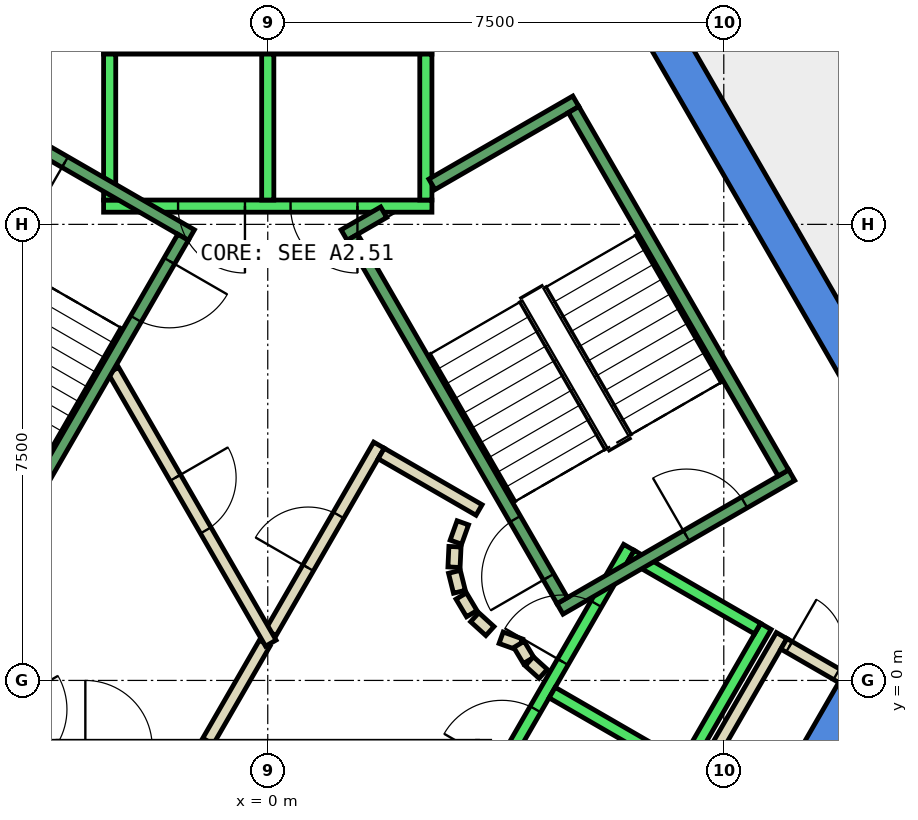
"""IFC4 building model, lengths in metres.
Left out: names, types, materials, properties, quantities, classifications, styles, units other than length and angle.
Written with IfcOpenShell. Run it as: python <this file> out.ifc"""

import sys

from ifc_helpers import new_model, si_unit, direction, frame, frame_2d, origin, place, context, subcontext, project, spatial, polyline, rectangle, outline, extrude, element, fill, save


model = new_model("IFC4")
c1 = context("Model", 3, precision=1e-05, world=origin(), true_north=direction((0.0, 1.0)))
c2 = subcontext(c1, "Body", "Model", "MODEL_VIEW")
j1 = project(units=[si_unit("LENGTHUNIT", "METRE"), si_unit("PLANEANGLEUNIT", "RADIAN")], contexts=[c1])
p1 = place(None, origin())
s1 = spatial("IfcSite", under=j1, at=p1, CompositionType="ELEMENT")
p2 = place(p1, origin())
s2 = spatial("IfcBuilding", under=s1, at=p2, CompositionType="ELEMENT")
p3 = place(p2, frame((0.0, 0.0, 248.6)))
s3 = spatial("IfcBuildingStorey", under=s2, at=p3, CompositionType="ELEMENT", Elevation=248.6)
p4 = place(p3, frame((0.0, 0.0, -0.34)))
e1 = element("IfcWall", 1, at=p4, inside=s3, PredefinedType="SHEAR", context=c2, shape_type="SweptSolid", body=[
    extrude(outline(polyline([(6.786, 10.747), (6.266, 10.447), (10.854, 2.5), (11.547, 2.5), (6.786, 10.747)])), origin(), (0.0, 0.0, 1.0), 3.6),
])
p5 = place(p3, frame((0.0, 0.0, -0.34)))
e2 = element("IfcWall", 2, at=p5, inside=s3, PredefinedType="SHEAR", context=c2, shape_type="SweptSolid", body=[
    extrude(outline(polyline([(5.774, -7.5), (11.547, 2.5), (10.854, 2.5), (5.427, -6.9), (5.774, -7.5)])), origin(), (0.0, 0.0, 1.0), 3.6),
])
p6 = place(p3, frame((8.939, 12.559, 0.0), z_axis=(0.0, 0.0, 1.0), x_axis=(0.517045022441, -0.855958202699, 0.0)))
e3 = element("IfcWall", 3, at=p6, inside=s3, PredefinedType="PARTITIONING", context=c2, shape_type="SweptSolid", body=[
    extrude(rectangle(XDim=3.166, YDim=0.2, at=frame_2d((1.583, 0.0))), origin(), (0.0, 0.0, 1.0), 3.26),
])
p7 = place(p6, frame((1.083, 0.0, 0.0)))
e4 = element("IfcOpeningElement", 4, at=p7, cuts=e3, PredefinedType="OPENING", context=c2, shape_type="SweptSolid", body=[
    extrude(rectangle(XDim=1.0, YDim=2.1, at=frame_2d((0.5, 1.05))), frame((0.0, 0.11, 0.0), z_axis=(0.0, -1.0, 0.0), x_axis=(1.0, 0.0, 0.0)), (0.0, 0.0, 1.0), 0.22),
])
p8 = place(p3, frame((5.751, -3.938, 0.0), z_axis=(0.0, 0.0, 1.0), x_axis=(0.500034260056, 0.866005622828, 0.0)))
e5 = element("IfcWall", 5, at=p8, inside=s3, PredefinedType="PARTITIONING", context=c2, shape_type="SweptSolid", body=[
    extrude(rectangle(XDim=5.399, YDim=0.2, at=frame_2d((2.7, 0.0))), origin(), (0.0, 0.0, 1.0), 3.26),
])
p9 = place(p3, frame((8.488, 0.602, 0.0), z_axis=(0.0, 0.0, 1.0), x_axis=(0.866063652425, -0.499933745558, 0.0)))
e6 = element("IfcWall", 6, at=p9, inside=s3, PredefinedType="PARTITIONING", context=c2, shape_type="SweptSolid", body=[
    extrude(rectangle(XDim=1.1, YDim=0.2, at=frame_2d((0.55, 0.0))), origin(), (0.0, 0.0, 1.0), 3.26),
])
p10 = place(p9, frame((0.1, 0.0, 0.0)))
e7 = element("IfcOpeningElement", 7, at=p10, cuts=e6, PredefinedType="OPENING", context=c2, shape_type="SweptSolid", body=[
    extrude(rectangle(XDim=0.9, YDim=2.1, at=frame_2d((0.45, 1.05))), frame((0.0, 0.11, 0.0), z_axis=(0.0, -1.0, 0.0), x_axis=(1.0, 0.0, 0.0)), (0.0, 0.0, 1.0), 0.22),
])
p11 = place(p3, frame((9.358, -4.692, 0.0), z_axis=(0.0, 0.0, 1.0), x_axis=(0.500027777314, 0.866009365951, 0.0)))
e8 = element("IfcWall", 8, at=p11, inside=s3, PredefinedType="PARTITIONING", context=c2, shape_type="SweptSolid", body=[
    extrude(rectangle(XDim=7.36, YDim=0.15, at=frame_2d((3.68, 0.0))), origin(), (0.0, 0.0, 1.0), 3.26),
])
p12 = place(p3, frame((-0.982, -1.0, 0.0), z_axis=(0.0, 0.0, 1.0), x_axis=(0.50024047865, 0.865886518847, 0.0)))
e9 = element("IfcWall", 9, at=p12, inside=s3, PredefinedType="PARTITIONING", context=c2, shape_type="SweptSolid", body=[
    extrude(rectangle(XDim=1.863, YDim=0.2, at=frame_2d((0.931, 0.0))), origin(), (0.0, 0.0, 1.0), 3.26),
])
p13 = place(p3, frame((0.05, 0.787, 0.0), z_axis=(0.0, 0.0, 1.0), x_axis=(0.499954076797, 0.866051915934, 0.0)))
e10 = element("IfcWall", 10, at=p13, inside=s3, PredefinedType="PARTITIONING", context=c2, shape_type="SweptSolid", body=[
    extrude(rectangle(XDim=3.558, YDim=0.2, at=frame_2d((1.779, 0.0))), origin(), (0.0, 0.0, 1.0), 3.26),
])
p14 = place(p13, frame((1.229, 0.0, 0.0)))
e11 = element("IfcOpeningElement", 11, at=p14, cuts=e10, PredefinedType="OPENING", context=c2, shape_type="SweptSolid", body=[
    extrude(rectangle(XDim=1.0, YDim=2.1, at=frame_2d((0.5, 1.05))), frame((0.0, 0.11, 0.0), z_axis=(0.0, -1.0, 0.0), x_axis=(1.0, 0.0, 0.0)), (0.0, 0.0, 1.0), 0.22),
])
p15 = place(p3, frame((1.866, 3.732, 0.0), z_axis=(0.0, 0.0, 1.0), x_axis=(0.866043361281, -0.499968895414, 0.0)))
e12 = element("IfcWall", 12, at=p15, inside=s3, PredefinedType="PARTITIONING", context=c2, shape_type="SweptSolid", body=[
    extrude(rectangle(XDim=1.858, YDim=0.2, at=frame_2d((0.929, 0.0))), origin(), (0.0, 0.0, 1.0), 3.26),
])
p16 = place(p3, frame((3.208, 2.592, 0.0), z_axis=(0.0, 0.0, 1.0), x_axis=(-0.337388820924, -0.941365382578, 0.0)))
e13 = element("IfcWall", 13, at=p16, inside=s3, PredefinedType="PARTITIONING", context=c2, shape_type="SweptSolid", body=[
    extrude(rectangle(XDim=0.338, YDim=0.2, at=frame_2d((0.169, 0.0))), origin(), (0.0, 0.0, 1.0), 3.26),
])
p17 = place(p3, frame((3.079, 2.199, 0.0), z_axis=(0.0, 0.0, 1.0), x_axis=(-0.047771483479, -0.998858290933, 0.0)))
e14 = element("IfcWall", 14, at=p17, inside=s3, PredefinedType="PARTITIONING", context=c2, shape_type="SweptSolid", body=[
    extrude(rectangle(XDim=0.337, YDim=0.2, at=frame_2d((0.169, 0.0))), origin(), (0.0, 0.0, 1.0), 3.26),
])
p18 = place(p3, frame((3.07, 1.786, 0.0), z_axis=(0.0, 0.0, 1.0), x_axis=(0.242705583207, -0.970099994784, 0.0)))
e15 = element("IfcWall", 15, at=p18, inside=s3, PredefinedType="PARTITIONING", context=c2, shape_type="SweptSolid", body=[
    extrude(rectangle(XDim=0.338, YDim=0.2, at=frame_2d((0.169, 0.0))), origin(), (0.0, 0.0, 1.0), 3.26),
])
for number, where, z_axis, x_axis in (
    (16, (3.182, 1.388, 0.0), (0.0, 0.0, 1.0), (0.512, -0.859, 0.0)),
    (17, (3.404, 1.039, 0.0), (0.0, 0.0, 1.0), (0.74, -0.672, 0.0)),
):
    element("IfcWall", number, at=place(p3, frame(where, z_axis=z_axis, x_axis=x_axis)), inside=s3, PredefinedType="PARTITIONING", context=c2, shape_type="SweptSolid", body=[
        extrude(rectangle(XDim=0.338, YDim=0.2, at=frame_2d((0.169, 0.0))), origin(), (0.0, 0.0, 1.0), 3.26),
    ])
p19 = place(p3, frame((3.838, 0.702, 0.0), z_axis=(0.0, 0.0, 1.0), x_axis=(0.941035081519, -0.338308993895, 0.0)))
e18 = element("IfcWall", 18, at=p19, inside=s3, PredefinedType="PARTITIONING", context=c2, shape_type="SweptSolid", body=[
    extrude(rectangle(XDim=0.337, YDim=0.2, at=frame_2d((0.168, 0.0))), origin(), (0.0, 0.0, 1.0), 3.26),
])
p20 = place(p3, frame((4.132, 0.593, 0.0), z_axis=(0.0, 0.0, 1.0), x_axis=(0.513561617048, -0.858052717201, 0.0)))
e19 = element("IfcWall", 19, at=p20, inside=s3, PredefinedType="PARTITIONING", context=c2, shape_type="SweptSolid", body=[
    extrude(rectangle(XDim=0.308, YDim=0.2, at=frame_2d((0.154, 0.0))), origin(), (0.0, 0.0, 1.0), 3.26),
])
p21 = place(p3, frame((4.301, 0.315, 0.0), z_axis=(0.0, 0.0, 1.0), x_axis=(0.741798017506, -0.670623367639, 0.0)))
e20 = element("IfcWall", 20, at=p21, inside=s3, PredefinedType="PARTITIONING", context=c2, shape_type="SweptSolid", body=[
    extrude(rectangle(XDim=0.309, YDim=0.2, at=frame_2d((0.154, 0.0))), origin(), (0.0, 0.0, 1.0), 3.26),
])
p22 = place(p3, frame((-2.54, 5.1, 0.0), z_axis=(0.0, 0.0, 1.0), x_axis=(0.499925051871, -0.866068670783, 0.0)))
e21 = element("IfcWall", 21, at=p22, inside=s3, PredefinedType="PARTITIONING", context=c2, shape_type="SweptSolid", body=[
    extrude(rectangle(XDim=5.181, YDim=0.2, at=frame_2d((2.59, 0.0))), origin(), (0.0, 0.0, 1.0), 3.26),
])
p23 = place(p22, frame((2.04, 0.0, 0.0)))
e22 = element("IfcOpeningElement", 22, at=p23, cuts=e21, PredefinedType="OPENING", context=c2, shape_type="SweptSolid", body=[
    extrude(rectangle(XDim=1.0, YDim=2.1, at=frame_2d((0.5, 1.05))), frame((0.0, 0.11, 0.0), z_axis=(0.0, -1.0, 0.0), x_axis=(1.0, 0.0, 0.0)), (0.0, 0.0, 1.0), 0.22),
])
p24 = place(p3, frame((2.7, 7.8, 0.0), z_axis=(0.0, 0.0, 1.0), x_axis=(-1.0, 0.0, 0.0)))
e23 = element("IfcWall", 23, at=p24, inside=s3, PredefinedType="STANDARD", context=c2, shape_type="SweptSolid", body=[
    extrude(rectangle(XDim=5.4, YDim=0.2, at=frame_2d((2.7, 0.0))), origin(), (0.0, 0.0, 1.0), 3.26),
])
p25 = place(p24, frame((1.225, 0.0, 0.0)))
e24 = element("IfcOpeningElement", 24, at=p25, cuts=e23, PredefinedType="OPENING", context=c2, shape_type="SweptSolid", body=[
    extrude(rectangle(XDim=1.1, YDim=2.1, at=frame_2d((0.55, 1.05))), frame((0.0, 0.11, 0.0), z_axis=(0.0, -1.0, 0.0), x_axis=(1.0, 0.0, 0.0)), (0.0, 0.0, 1.0), 0.22),
])
p26 = place(p24, frame((3.075, 0.0, 0.0)))
e25 = element("IfcOpeningElement", 25, at=p26, cuts=e23, PredefinedType="OPENING", context=c2, shape_type="SweptSolid", body=[
    extrude(rectangle(XDim=1.1, YDim=2.1, at=frame_2d((0.55, 1.05))), frame((0.0, 0.11, 0.0), z_axis=(0.0, -1.0, 0.0), x_axis=(1.0, 0.0, 0.0)), (0.0, 0.0, 1.0), 0.22),
])
p27 = place(p3, frame((2.7, 10.4, 0.0), z_axis=(0.0, 0.0, 1.0), x_axis=(-1.0, 0.0, 0.0)))
e26 = element("IfcWall", 26, at=p27, inside=s3, PredefinedType="STANDARD", context=c2, shape_type="SweptSolid", body=[
    extrude(rectangle(XDim=5.4, YDim=0.2, at=frame_2d((2.7, 0.0))), origin(), (0.0, 0.0, 1.0), 3.26),
])
for number, where, z_axis, x_axis in (
    (27, (2.6, 7.9, 0.0), (0.0, 0.0, 1.0), (0.0, 1.0, 0.0)),
    (28, (0.0, 7.9, 0.0), (0.0, 0.0, 1.0), (0.0, 1.0, 0.0)),
    (29, (-2.6, 7.9, 0.0), (0.0, 0.0, 1.0), (0.0, 1.0, 0.0)),
):
    element("IfcWall", number, at=place(p3, frame(where, z_axis=z_axis, x_axis=x_axis)), inside=s3, PredefinedType="STANDARD", context=c2, shape_type="SweptSolid", body=[
        extrude(rectangle(XDim=2.4, YDim=0.2, at=frame_2d((1.2, 0.0))), origin(), (0.0, 0.0, 1.0), 3.26),
    ])
p28 = place(p3, frame((-5.94, 2.188, 0.0), z_axis=(0.0, 0.0, 1.0), x_axis=(0.500034260056, -0.866005622828, 0.0)))
e30 = element("IfcWall", 30, at=p28, inside=s3, PredefinedType="STANDARD", context=c2, shape_type="SweptSolid", body=[
    extrude(rectangle(XDim=5.399, YDim=0.2, at=frame_2d((2.7, 0.0))), origin(), (0.0, 0.0, 1.0), 3.26),
])
p29 = place(p28, frame((3.075, 0.0, 0.0)))
e31 = element("IfcOpeningElement", 31, at=p29, cuts=e30, PredefinedType="OPENING", context=c2, shape_type="SweptSolid", body=[
    extrude(rectangle(XDim=1.1, YDim=2.1, at=frame_2d((0.55, 1.05))), frame((0.0, 0.11, 0.0), z_axis=(0.0, -1.0, 0.0), x_axis=(1.0, 0.0, 0.0)), (0.0, 0.0, 1.0), 0.22),
])
p30 = place(p28, frame((1.225, 0.0, 0.0)))
e32 = element("IfcOpeningElement", 32, at=p30, cuts=e30, PredefinedType="OPENING", context=c2, shape_type="SweptSolid", body=[
    extrude(rectangle(XDim=1.1, YDim=2.1, at=frame_2d((0.55, 1.05))), frame((0.0, 0.11, 0.0), z_axis=(0.0, -1.0, 0.0), x_axis=(1.0, 0.0, 0.0)), (0.0, 0.0, 1.0), 0.22),
])
p31 = place(p3, frame((3.24, -2.488, 0.0), z_axis=(0.0, 0.0, 1.0), x_axis=(0.500034260056, 0.866005622828, 0.0)))
e33 = element("IfcWall", 33, at=p31, inside=s3, PredefinedType="STANDARD", context=c2, shape_type="SweptSolid", body=[
    extrude(rectangle(XDim=5.399, YDim=0.2, at=frame_2d((2.7, 0.0))), origin(), (0.0, 0.0, 1.0), 3.26),
])
p32 = place(p31, frame((3.225, 0.0, 0.0)))
e34 = element("IfcOpeningElement", 34, at=p32, cuts=e33, PredefinedType="OPENING", context=c2, shape_type="SweptSolid", body=[
    extrude(rectangle(XDim=1.1, YDim=2.1, at=frame_2d((0.55, 1.05))), frame((0.0, 0.11, 0.0), z_axis=(0.0, -1.0, 0.0), x_axis=(1.0, 0.0, 0.0)), (0.0, 0.0, 1.0), 0.22),
])
p33 = place(p31, frame((1.225, 0.0, 0.0)))
e35 = element("IfcOpeningElement", 35, at=p33, cuts=e33, PredefinedType="OPENING", context=c2, shape_type="SweptSolid", body=[
    extrude(rectangle(XDim=1.1, YDim=2.1, at=frame_2d((0.55, 1.05))), frame((0.0, 0.11, 0.0), z_axis=(0.0, -1.0, 0.0), x_axis=(1.0, 0.0, 0.0)), (0.0, 0.0, 1.0), 0.22),
])
p34 = place(p3, frame((5.492, -3.788, 0.0), z_axis=(0.0, 0.0, 1.0), x_axis=(0.500034260056, 0.866005622828, 0.0)))
e36 = element("IfcWall", 36, at=p34, inside=s3, PredefinedType="STANDARD", context=c2, shape_type="SweptSolid", body=[
    extrude(rectangle(XDim=5.399, YDim=0.2, at=frame_2d((2.7, 0.0))), origin(), (0.0, 0.0, 1.0), 3.26),
])
for number, where, z_axis, x_axis in (
    (37, (4.677, -0.2, 0.0), (0.0, 0.0, 1.0), (0.866, -0.5, 0.0)),
    (38, (5.977, 2.052, 0.0), (0.0, 0.0, 1.0), (0.866, -0.5, 0.0)),
):
    element("IfcWall", number, at=place(p3, frame(where, z_axis=z_axis, x_axis=x_axis)), inside=s3, PredefinedType="STANDARD", context=c2, shape_type="SweptSolid", body=[
        extrude(rectangle(XDim=2.399, YDim=0.2, at=frame_2d((1.2, 0.0))), origin(), (0.0, 0.0, 1.0), 3.26),
    ])
p35 = place(p3, frame((4.806, 1.176, 0.0), z_axis=(0.0, 0.0, 1.0), x_axis=(0.866059941101, 0.499940174841, 0.0)))
e39 = element("IfcWall", 39, at=p35, inside=s3, PredefinedType="STANDARD", context=c2, shape_type="SweptSolid", body=[
    extrude(rectangle(XDim=4.4, YDim=0.2, at=frame_2d((2.2, 0.0))), origin(), (0.0, 0.0, 1.0), 3.26),
])
p36 = place(p35, frame((2.4, 0.0, 0.0)))
e40 = element("IfcOpeningElement", 40, at=p36, cuts=e39, PredefinedType="OPENING", context=c2, shape_type="SweptSolid", body=[
    extrude(rectangle(XDim=1.1, YDim=2.2, at=frame_2d((0.55, 1.1))), frame((0.0, 0.11, 0.0), z_axis=(0.0, -1.0, 0.0), x_axis=(1.0, 0.0, 0.0)), (0.0, 0.0, 1.0), 0.22),
])
p37 = place(p3, frame((2.7, 8.158, 0.0), z_axis=(0.0, 0.0, 1.0), x_axis=(0.86611865017, 0.499838457731, 0.0)))
e41 = element("IfcWall", 41, at=p37, inside=s3, PredefinedType="STANDARD", context=c2, shape_type="SweptSolid", body=[
    extrude(rectangle(XDim=2.733, YDim=0.2, at=frame_2d((1.366, 0.0))), origin(), (0.0, 0.0, 1.0), 3.26),
])
p38 = place(p3, frame((1.256, 7.324, 0.0), z_axis=(0.0, 0.0, 1.0), x_axis=(0.865915093549, 0.500191014278, 0.0)))
e42 = element("IfcWall", 42, at=p38, inside=s3, PredefinedType="STANDARD", context=c2, shape_type="SweptSolid", body=[
    extrude(rectangle(XDim=0.752, YDim=0.2, at=frame_2d((0.376, 0.0))), origin(), (0.0, 0.0, 1.0), 3.26),
])
p39 = place(p3, frame((4.843, 1.312, 0.0), z_axis=(0.0, 0.0, 1.0), x_axis=(-0.499963383562, 0.866046543262, 0.0)))
e43 = element("IfcWall", 43, at=p39, inside=s3, PredefinedType="STANDARD", context=c2, shape_type="SweptSolid", body=[
    extrude(rectangle(XDim=6.9, YDim=0.2, at=frame_2d((3.45, 0.0))), origin(), (0.0, 0.0, 1.0), 3.26),
])
p40 = place(p39, frame((0.45, 0.0, 0.0)))
e44 = element("IfcOpeningElement", 44, at=p40, cuts=e43, PredefinedType="OPENING", context=c2, shape_type="SweptSolid", body=[
    extrude(rectangle(XDim=1.1, YDim=2.2, at=frame_2d((0.55, 1.1))), frame((0.0, 0.11, 0.0), z_axis=(0.0, -1.0, 0.0), x_axis=(1.0, 0.0, 0.0)), (0.0, 0.0, 1.0), 0.22),
])
p41 = place(p3, frame((8.48, 3.412, 0.0), z_axis=(0.0, 0.0, 1.0), x_axis=(-0.499978703459, 0.866037698999, 0.0)))
e45 = element("IfcWall", 45, at=p41, inside=s3, PredefinedType="STANDARD", context=c2, shape_type="SweptSolid", body=[
    extrude(rectangle(XDim=6.9, YDim=0.2, at=frame_2d((3.45, 0.0))), origin(), (0.0, 0.0, 1.0), 3.26),
])
p42 = place(p3, frame((-1.256, 7.324, 0.0), z_axis=(0.0, 0.0, 1.0), x_axis=(-0.866046073146, 0.499964197906, 0.0)))
e46 = element("IfcWall", 46, at=p42, inside=s3, PredefinedType="STANDARD", context=c2, shape_type="SweptSolid", body=[
    extrude(rectangle(XDim=4.4, YDim=0.2, at=frame_2d((2.2, 0.0))), origin(), (0.0, 0.0, 1.0), 3.26),
])
p43 = place(p42, frame((2.4, 0.0, 0.0)))
e47 = element("IfcOpeningElement", 47, at=p43, cuts=e46, PredefinedType="OPENING", context=c2, shape_type="SweptSolid", body=[
    extrude(rectangle(XDim=1.1, YDim=2.2, at=frame_2d((0.55, 1.1))), frame((0.0, 0.11, 0.0), z_axis=(0.0, -1.0, 0.0), x_axis=(1.0, 0.0, 0.0)), (0.0, 0.0, 1.0), 0.22),
])
p44 = place(p3, frame((-1.393, 7.288, 0.0), z_axis=(0.0, 0.0, 1.0), x_axis=(-0.499963383562, -0.866046543262, 0.0)))
e48 = element("IfcWall", 48, at=p44, inside=s3, PredefinedType="STANDARD", context=c2, shape_type="SweptSolid", body=[
    extrude(rectangle(XDim=6.9, YDim=0.2, at=frame_2d((3.45, 0.0))), origin(), (0.0, 0.0, 1.0), 3.26),
])
p45 = place(p44, frame((0.45, 0.0, 0.0)))
e49 = element("IfcOpeningElement", 49, at=p45, cuts=e48, PredefinedType="OPENING", context=c2, shape_type="SweptSolid", body=[
    extrude(rectangle(XDim=1.1, YDim=2.2, at=frame_2d((0.55, 1.1))), frame((0.0, 0.11, 0.0), z_axis=(0.0, -1.0, 0.0), x_axis=(1.0, 0.0, 0.0)), (0.0, 0.0, 1.0), 0.22),
])
p46 = place(p14, origin())
e50 = element("IfcDoor", 50, at=p46, inside=s3, OperationType="SINGLE_SWING_RIGHT", PredefinedType="DOOR", context=c2, shape_type="SweptSolid", body=[
    extrude(rectangle(XDim=1.0, YDim=2.1, at=frame_2d((0.5, 1.05))), frame((0.0, 0.025, 0.0), z_axis=(0.0, -1.0, 0.0), x_axis=(1.0, 0.0, 0.0)), (0.0, 0.0, 1.0), 0.05),
])
fill(e11, e50)
p47 = place(p23, origin())
e51 = element("IfcDoor", 51, at=p47, inside=s3, OperationType="SINGLE_SWING_RIGHT", PredefinedType="DOOR", context=c2, shape_type="SweptSolid", body=[
    extrude(rectangle(XDim=1.0, YDim=2.1, at=frame_2d((0.5, 1.05))), frame((0.0, 0.025, 0.0), z_axis=(0.0, -1.0, 0.0), x_axis=(1.0, 0.0, 0.0)), (0.0, 0.0, 1.0), 0.05),
])
fill(e22, e51)
p48 = place(p10, origin())
e52 = element("IfcDoor", 52, at=p48, inside=s3, OperationType="SINGLE_SWING_RIGHT", PredefinedType="DOOR", context=c2, shape_type="SweptSolid", body=[
    extrude(rectangle(XDim=0.9, YDim=2.1, at=frame_2d((0.45, 1.05))), frame((0.0, 0.025, 0.0), z_axis=(0.0, -1.0, 0.0), x_axis=(1.0, 0.0, 0.0)), (0.0, 0.0, 1.0), 0.05),
])
fill(e7, e52)
p49 = place(p25, origin())
e53 = element("IfcDoor", 53, at=p49, inside=s3, OperationType="SLIDING_TO_LEFT", PredefinedType="DOOR", context=c2, shape_type="SweptSolid", body=[
    extrude(rectangle(XDim=1.1, YDim=2.1, at=frame_2d((0.55, 1.05))), frame((0.0, 0.025, 0.0), z_axis=(0.0, -1.0, 0.0), x_axis=(1.0, 0.0, 0.0)), (0.0, 0.0, 1.0), 0.05),
])
fill(e24, e53)
p50 = place(p26, origin())
e54 = element("IfcDoor", 54, at=p50, inside=s3, OperationType="SLIDING_TO_LEFT", PredefinedType="DOOR", context=c2, shape_type="SweptSolid", body=[
    extrude(rectangle(XDim=1.1, YDim=2.1, at=frame_2d((0.55, 1.05))), frame((0.0, 0.025, 0.0), z_axis=(0.0, -1.0, 0.0), x_axis=(1.0, 0.0, 0.0)), (0.0, 0.0, 1.0), 0.05),
])
fill(e25, e54)
p51 = place(p32, origin())
e55 = element("IfcDoor", 55, at=p51, inside=s3, OperationType="SLIDING_TO_LEFT", PredefinedType="DOOR", context=c2, shape_type="SweptSolid", body=[
    extrude(rectangle(XDim=1.1, YDim=2.1, at=frame_2d((0.55, 1.05))), frame((0.0, 0.025, 0.0), z_axis=(0.0, -1.0, 0.0), x_axis=(1.0, 0.0, 0.0)), (0.0, 0.0, 1.0), 0.05),
])
fill(e34, e55)
p52 = place(p33, origin())
e56 = element("IfcDoor", 56, at=p52, inside=s3, OperationType="SLIDING_TO_LEFT", PredefinedType="DOOR", context=c2, shape_type="SweptSolid", body=[
    extrude(rectangle(XDim=1.1, YDim=2.1, at=frame_2d((0.55, 1.05))), frame((0.0, 0.025, 0.0), z_axis=(0.0, -1.0, 0.0), x_axis=(1.0, 0.0, 0.0)), (0.0, 0.0, 1.0), 0.05),
])
fill(e35, e56)
p53 = place(p40, origin())
e57 = element("IfcDoor", 57, at=p53, inside=s3, OperationType="SINGLE_SWING_LEFT", PredefinedType="DOOR", context=c2, shape_type="SweptSolid", body=[
    extrude(rectangle(XDim=1.1, YDim=2.2, at=frame_2d((0.55, 1.1))), frame((0.0, 0.025, 0.0), z_axis=(0.0, -1.0, 0.0), x_axis=(1.0, 0.0, 0.0)), (0.0, 0.0, 1.0), 0.05),
])
fill(e44, e57)
p54 = place(p36, origin())
e58 = element("IfcDoor", 58, at=p54, inside=s3, OperationType="SINGLE_SWING_LEFT", PredefinedType="DOOR", context=c2, shape_type="SweptSolid", body=[
    extrude(rectangle(XDim=1.1, YDim=2.2, at=frame_2d((0.55, 1.1))), frame((0.0, 0.025, 0.0), z_axis=(0.0, -1.0, 0.0), x_axis=(1.0, 0.0, 0.0)), (0.0, 0.0, 1.0), 0.05),
])
fill(e40, e58)
p55 = place(p45, origin())
e59 = element("IfcDoor", 59, at=p55, inside=s3, OperationType="SINGLE_SWING_LEFT", PredefinedType="DOOR", context=c2, shape_type="SweptSolid", body=[
    extrude(rectangle(XDim=1.1, YDim=2.2, at=frame_2d((0.55, 1.1))), frame((0.0, 0.025, 0.0), z_axis=(0.0, -1.0, 0.0), x_axis=(1.0, 0.0, 0.0)), (0.0, 0.0, 1.0), 0.05),
])
fill(e49, e59)
p56 = place(p43, origin())
e60 = element("IfcDoor", 60, at=p56, inside=s3, OperationType="SINGLE_SWING_LEFT", PredefinedType="DOOR", context=c2, shape_type="SweptSolid", body=[
    extrude(rectangle(XDim=1.1, YDim=2.2, at=frame_2d((0.55, 1.1))), frame((0.0, 0.025, 0.0), z_axis=(0.0, -1.0, 0.0), x_axis=(1.0, 0.0, 0.0)), (0.0, 0.0, 1.0), 0.05),
])
fill(e47, e60)
save(model, sys.argv[1])
